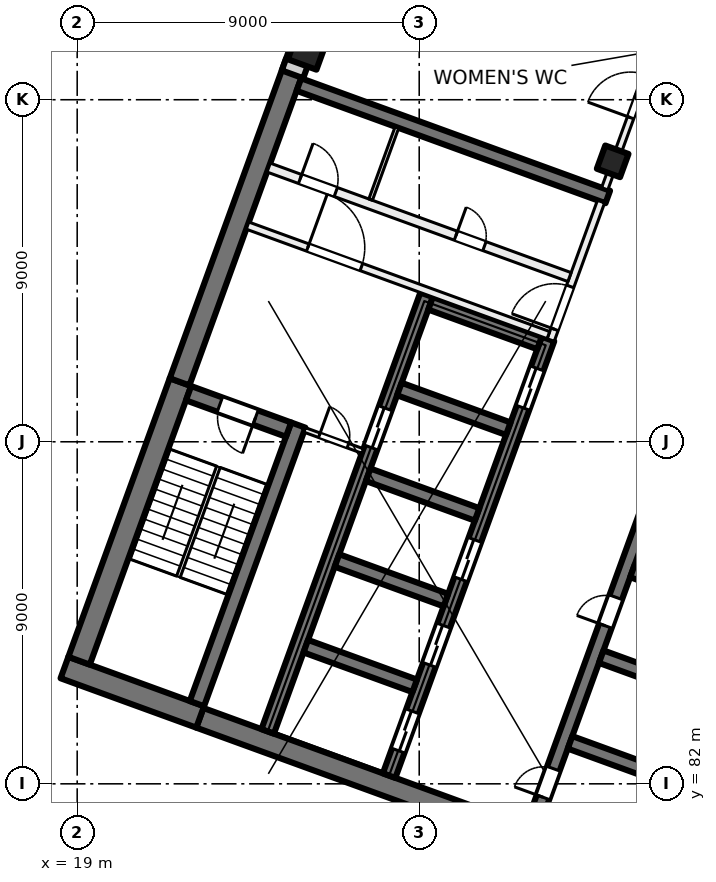
"""IFC4 building model, lengths in metres.
Left out: names, types, materials, properties, quantities, classifications, styles, units other than length and angle.
Written with IfcOpenShell. Run it as: python <this file> out.ifc"""

import sys

from ifc_helpers import new_model, si_unit, direction, frame, frame_2d, origin, origin_2d, place, context, subcontext, project, spatial, rectangle, extrude, element, fill, save


model = new_model("IFC4")
c1 = context("Model", 3, precision=1e-05, world=origin(), true_north=direction((0.0, 1.0)))
c2 = subcontext(c1, "Body", "Model", "MODEL_VIEW")
j1 = project(units=[si_unit("LENGTHUNIT", "METRE"), si_unit("PLANEANGLEUNIT", "RADIAN")], contexts=[c1])
p1 = place(None, origin())
s1 = spatial("IfcSite", under=j1, at=p1, CompositionType="ELEMENT")
p2 = place(p1, origin())
s2 = spatial("IfcBuilding", under=s1, at=p2, CompositionType="ELEMENT")
p3 = place(p2, frame((0.0, 0.0, 142.5)))
s3 = spatial("IfcBuildingStorey", under=s2, at=p3, CompositionType="ELEMENT", Elevation=142.5)
p4 = place(p3, frame((33.091, 98.379, 0.0), z_axis=(0.0, 0.0, 1.0), x_axis=(-0.342020143326, -0.939692620786, 0.0)))
e1 = element("IfcColumn", 1, at=p4, inside=s3, PredefinedType="COLUMN", context=c2, shape_type="SweptSolid", body=[
    extrude(rectangle(XDim=0.65, YDim=0.65, at=origin_2d()), origin(), (0.0, 0.0, 1.0), 4.0),
])
p5 = place(p3, frame((25.056, 101.303, 0.0), z_axis=(0.0, 0.0, 1.0), x_axis=(-0.342020143326, -0.939692620786, 0.0)))
e2 = element("IfcColumn", 2, at=p5, inside=s3, PredefinedType="COLUMN", context=c2, shape_type="SweptSolid", body=[
    extrude(rectangle(XDim=0.8, YDim=0.8, at=origin_2d()), origin(), (0.0, 0.0, 1.0), 4.0),
])
p6 = place(p3, frame((35.759, 78.811, 0.0), z_axis=(0.0, 0.0, 1.0), x_axis=(-0.939692894512, 0.342019391267, 0.0)))
e3 = element("IfcWall", 3, at=p6, inside=s3, PredefinedType="SHEAR", context=c2, shape_type="SweptSolid", body=[
    extrude(rectangle(XDim=14.4, YDim=0.55, at=frame_2d((7.2, 0.0))), origin(), (0.0, 0.0, 1.0), 4.0),
])
p7 = place(p3, frame((22.236, 83.76, 0.0), z_axis=(0.0, 0.0, 1.0), x_axis=(-0.939680822529, 0.342052557032, 0.0)))
e4 = element("IfcWall", 4, at=p7, inside=s3, PredefinedType="SHEAR", context=c2, shape_type="SweptSolid", body=[
    extrude(rectangle(XDim=3.8, YDim=0.6, at=frame_2d((1.9, 0.0))), origin(), (0.0, 0.0, 1.0), 4.0),
])
p8 = place(p3, frame((19.05, 85.239, 0.0), z_axis=(0.0, 0.0, 1.0), x_axis=(0.342016982193, 0.939693771338, 0.0)))
e5 = element("IfcWall", 5, at=p8, inside=s3, PredefinedType="SHEAR", context=c2, shape_type="SweptSolid", body=[
    extrude(rectangle(XDim=7.8, YDim=0.6, at=frame_2d((3.9, 0.0))), origin(), (0.0, 0.0, 1.0), 4.0),
])
p9 = place(p3, frame((21.694, 92.577, 0.0), z_axis=(0.0, 0.0, 1.0), x_axis=(0.342010253184, 0.939696220444, 0.0)))
e6 = element("IfcWall", 6, at=p9, inside=s3, PredefinedType="SHEAR", context=c2, shape_type="SweptSolid", body=[
    extrude(rectangle(XDim=8.95, YDim=0.55, at=frame_2d((4.475, 0.0))), origin(), (0.0, 0.0, 1.0), 4.0),
])
p10 = place(p3, frame((22.15, 84.11, 0.0), z_axis=(0.0, 0.0, 1.0), x_axis=(0.342016982193, 0.939693771338, 0.0)))
e7 = element("IfcWall", 7, at=p10, inside=s3, PredefinedType="SHEAR", context=c2, shape_type="SweptSolid", body=[
    extrude(rectangle(XDim=7.8, YDim=0.4, at=frame_2d((3.9, 0.0))), origin(), (0.0, 0.0, 1.0), 4.0),
])
p11 = place(p3, frame((24.562, 91.32, 0.0), z_axis=(0.0, 0.0, 1.0), x_axis=(-0.939717030584, 0.341953070509, 0.0)))
e8 = element("IfcWall", 8, at=p11, inside=s3, PredefinedType="SHEAR", context=c2, shape_type="SweptSolid", body=[
    extrude(rectangle(XDim=2.8, YDim=0.4, at=frame_2d((1.4, 0.0))), origin(), (0.0, 0.0, 1.0), 4.0),
])
p12 = place(p11, frame((0.925, 0.0, 0.0)))
e9 = element("IfcOpeningElement", 9, at=p12, cuts=e8, PredefinedType="OPENING", context=c2, shape_type="SweptSolid", body=[
    extrude(rectangle(XDim=1.0, YDim=2.1, at=frame_2d((0.5, 1.05))), frame((0.0, 0.21, 0.0), z_axis=(0.0, -1.0, 0.0), x_axis=(1.0, 0.0, 0.0)), (0.0, 0.0, 1.0), 0.42),
])
p13 = place(p3, frame((30.967, 80.848, 0.0), z_axis=(0.0, 0.0, 1.0), x_axis=(0.34201563943, 0.939694260058, 0.0)))
e10 = element("IfcWall", 10, at=p13, inside=s3, PredefinedType="SHEAR", context=c2, shape_type="SweptSolid", body=[
    extrude(rectangle(XDim=12.225, YDim=0.35, at=frame_2d((6.113, 0.0))), origin(), (0.0, 0.0, 1.0), 4.0),
])
p14 = place(p13, frame((0.85, 0.0, 0.0)))
e11 = element("IfcOpeningElement", 11, at=p14, cuts=e10, PredefinedType="OPENING", context=c2, shape_type="SweptSolid", body=[
    extrude(rectangle(XDim=0.8, YDim=2.1, at=frame_2d((0.4, 1.05))), frame((0.0, 0.185, 0.0), z_axis=(0.0, -1.0, 0.0), x_axis=(1.0, 0.0, 0.0)), (0.0, 0.0, 1.0), 0.37),
])
p15 = place(p13, frame((5.65, 0.0, 0.0)))
e12 = element("IfcOpeningElement", 12, at=p15, cuts=e10, PredefinedType="OPENING", context=c2, shape_type="SweptSolid", body=[
    extrude(rectangle(XDim=0.8, YDim=2.1, at=frame_2d((0.4, 1.05))), frame((0.0, 0.185, 0.0), z_axis=(0.0, -1.0, 0.0), x_axis=(1.0, 0.0, 0.0)), (0.0, 0.0, 1.0), 0.37),
])
p16 = place(p3, frame((34.835, 82.047, 0.0), z_axis=(0.0, 0.0, 1.0), x_axis=(-0.939683528043, 0.3420451244, 0.0)))
e13 = element("IfcWall", 13, at=p16, inside=s3, PredefinedType="SHEAR", context=c2, shape_type="SweptSolid", body=[
    extrude(rectangle(XDim=3.05, YDim=0.35, at=frame_2d((1.525, 0.0))), origin(), (0.0, 0.0, 1.0), 4.0),
])
p17 = place(p3, frame((35.656, 84.303, 0.0), z_axis=(0.0, 0.0, 1.0), x_axis=(-0.939709254651, 0.341974438698, 0.0)))
e14 = element("IfcWall", 14, at=p17, inside=s3, PredefinedType="SHEAR", context=c2, shape_type="SweptSolid", body=[
    extrude(rectangle(XDim=3.05, YDim=0.35, at=frame_2d((1.525, 0.0))), origin(), (0.0, 0.0, 1.0), 4.0),
])
p18 = place(p3, frame((36.477, 86.558, 0.0), z_axis=(0.0, 0.0, 1.0), x_axis=(-0.939683528043, 0.3420451244, 0.0)))
e15 = element("IfcWall", 15, at=p18, inside=s3, PredefinedType="SHEAR", context=c2, shape_type="SweptSolid", body=[
    extrude(rectangle(XDim=3.05, YDim=0.35, at=frame_2d((1.525, 0.0))), origin(), (0.0, 0.0, 1.0), 4.0),
])
p19 = place(p3, frame((27.208, 82.216, 0.0), z_axis=(0.0, 0.0, 1.0), x_axis=(0.34201563943, 0.939694260058, 0.0)))
e16 = element("IfcWall", 16, at=p19, inside=s3, PredefinedType="SHEAR", context=c2, shape_type="SweptSolid", body=[
    extrude(rectangle(XDim=12.225, YDim=0.35, at=frame_2d((6.113, 0.0))), origin(), (0.0, 0.0, 1.0), 4.0),
])
p20 = place(p19, frame((0.7, 0.0, 0.0)))
e17 = element("IfcOpeningElement", 17, at=p20, cuts=e16, PredefinedType="OPENING", context=c2, shape_type="SweptSolid", body=[
    extrude(rectangle(XDim=1.1, YDim=2.1, at=frame_2d((0.55, 1.05))), frame((0.0, 0.185, 0.0), z_axis=(0.0, -1.0, 0.0), x_axis=(1.0, 0.0, 0.0)), (0.0, 0.0, 1.0), 0.37),
])
p21 = place(p19, frame((3.1, 0.0, 0.0)))
e18 = element("IfcOpeningElement", 18, at=p21, cuts=e16, PredefinedType="OPENING", context=c2, shape_type="SweptSolid", body=[
    extrude(rectangle(XDim=1.1, YDim=2.1, at=frame_2d((0.55, 1.05))), frame((0.0, 0.185, 0.0), z_axis=(0.0, -1.0, 0.0), x_axis=(1.0, 0.0, 0.0)), (0.0, 0.0, 1.0), 0.37),
])
p22 = place(p19, frame((5.5, 0.0, 0.0)))
e19 = element("IfcOpeningElement", 19, at=p22, cuts=e16, PredefinedType="OPENING", context=c2, shape_type="SweptSolid", body=[
    extrude(rectangle(XDim=1.1, YDim=2.1, at=frame_2d((0.55, 1.05))), frame((0.0, 0.185, 0.0), z_axis=(0.0, -1.0, 0.0), x_axis=(1.0, 0.0, 0.0)), (0.0, 0.0, 1.0), 0.37),
])
p23 = place(p19, frame((10.3, 0.0, 0.0)))
e20 = element("IfcOpeningElement", 20, at=p23, cuts=e16, PredefinedType="OPENING", context=c2, shape_type="SweptSolid", body=[
    extrude(rectangle(XDim=1.1, YDim=2.1, at=frame_2d((0.55, 1.05))), frame((0.0, 0.185, 0.0), z_axis=(0.0, -1.0, 0.0), x_axis=(1.0, 0.0, 0.0)), (0.0, 0.0, 1.0), 0.37),
])
p24 = place(p3, frame((24.013, 83.379, 0.0), z_axis=(0.0, 0.0, 1.0), x_axis=(0.34201563943, 0.939694260058, 0.0)))
e21 = element("IfcWall", 21, at=p24, inside=s3, PredefinedType="SHEAR", context=c2, shape_type="SweptSolid", body=[
    extrude(rectangle(XDim=12.225, YDim=0.35, at=frame_2d((6.113, 0.0))), origin(), (0.0, 0.0, 1.0), 4.0),
])
p25 = place(p24, frame((7.95, 0.0, 0.0)))
e22 = element("IfcOpeningElement", 22, at=p25, cuts=e21, PredefinedType="OPENING", context=c2, shape_type="SweptSolid", body=[
    extrude(rectangle(XDim=1.1, YDim=2.1, at=frame_2d((0.55, 1.05))), frame((0.0, 0.185, 0.0), z_axis=(0.0, -1.0, 0.0), x_axis=(1.0, 0.0, 0.0)), (0.0, 0.0, 1.0), 0.37),
])
for number, where, z_axis, x_axis in (
    (23, (27.881, 84.578, 0.0), (0.0, 0.0, 1.0), (-0.94, 0.342, 0.0)),
    (24, (28.702, 86.833, 0.0), (0.0, 0.0, 1.0), (-0.94, 0.342, 0.0)),
    (25, (29.523, 89.089, 0.0), (0.0, 0.0, 1.0), (-0.94, 0.342, 0.0)),
):
    element("IfcWall", number, at=place(p3, frame(where, z_axis=z_axis, x_axis=x_axis)), inside=s3, PredefinedType="SHEAR", context=c2, shape_type="SweptSolid", body=[
        extrude(rectangle(XDim=3.05, YDim=0.35, at=frame_2d((1.525, 0.0))), origin(), (0.0, 0.0, 1.0), 4.0),
    ])
p26 = place(p3, frame((30.344, 91.344, 0.0), z_axis=(0.0, 0.0, 1.0), x_axis=(-0.939709254651, 0.341974438698, 0.0)))
e26 = element("IfcWall", 26, at=p26, inside=s3, PredefinedType="SHEAR", context=c2, shape_type="SweptSolid", body=[
    extrude(rectangle(XDim=3.05, YDim=0.35, at=frame_2d((1.525, 0.0))), origin(), (0.0, 0.0, 1.0), 4.0),
])
p27 = place(p3, frame((31.165, 93.599, 0.0), z_axis=(0.0, 0.0, 1.0), x_axis=(-0.939683528043, 0.3420451244, 0.0)))
e27 = element("IfcWall", 27, at=p27, inside=s3, PredefinedType="SHEAR", context=c2, shape_type="SweptSolid", body=[
    extrude(rectangle(XDim=3.05, YDim=0.35, at=frame_2d((1.525, 0.0))), origin(), (0.0, 0.0, 1.0), 4.0),
])
p28 = place(p3, frame((32.962, 97.441, 0.0), z_axis=(0.0, 0.0, 1.0), x_axis=(-0.939689545667, 0.342028592028, 0.0)))
e28 = element("IfcWall", 28, at=p28, inside=s3, PredefinedType="SHEAR", context=c2, shape_type="SweptSolid", body=[
    extrude(rectangle(XDim=8.65, YDim=0.35, at=frame_2d((4.325, 0.0))), origin(), (0.0, 0.0, 1.0), 4.0),
])
p29 = place(p3, frame((24.666, 100.669, 0.0), z_axis=(0.0, 0.0, 1.0), x_axis=(0.34201964167, 0.939692803373, 0.0)))
e29 = element("IfcWall", 29, at=p29, inside=s3, PredefinedType="SOLIDWALL", context=c2, shape_type="SweptSolid", body=[
    extrude(rectangle(XDim=32.884, YDim=0.6, at=frame_2d((16.442, 0.0))), origin(), (0.0, 0.0, 1.0), 3.625),
])
p30 = place(p29, frame((1.48, 0.0, 0.9)))
e30 = element("IfcOpeningElement", 30, at=p30, cuts=e29, PredefinedType="OPENING", context=c2, shape_type="SweptSolid", body=[
    extrude(rectangle(XDim=3.0, YDim=2.4, at=frame_2d((1.5, 1.2))), frame((0.0, 0.31, 0.0), z_axis=(0.0, -1.0, 0.0), x_axis=(1.0, 0.0, 0.0)), (0.0, 0.0, 1.0), 0.62),
])
p31 = place(p29, frame((5.98, 0.0, 0.9)))
e31 = element("IfcOpeningElement", 31, at=p31, cuts=e29, PredefinedType="OPENING", context=c2, shape_type="SweptSolid", body=[
    extrude(rectangle(XDim=3.0, YDim=2.4, at=frame_2d((1.5, 1.2))), frame((0.0, 0.31, 0.0), z_axis=(0.0, -1.0, 0.0), x_axis=(1.0, 0.0, 0.0)), (0.0, 0.0, 1.0), 0.62),
])
p32 = place(p29, frame((11.08, 0.0, 0.0)))
e32 = element("IfcOpeningElement", 32, at=p32, cuts=e29, PredefinedType="OPENING", context=c2, shape_type="SweptSolid", body=[
    extrude(rectangle(XDim=1.8, YDim=2.4, at=frame_2d((0.9, 1.2))), frame((0.0, 0.31, 0.0), z_axis=(0.0, -1.0, 0.0), x_axis=(1.0, 0.0, 0.0)), (0.0, 0.0, 1.0), 0.62),
])
p33 = place(p29, frame((14.98, 0.0, 0.9)))
e33 = element("IfcOpeningElement", 33, at=p33, cuts=e29, PredefinedType="OPENING", context=c2, shape_type="SweptSolid", body=[
    extrude(rectangle(XDim=3.0, YDim=2.4, at=frame_2d((1.5, 1.2))), frame((0.0, 0.31, 0.0), z_axis=(0.0, -1.0, 0.0), x_axis=(1.0, 0.0, 0.0)), (0.0, 0.0, 1.0), 0.62),
])
p34 = place(p29, frame((19.48, 0.0, 0.9)))
e34 = element("IfcOpeningElement", 34, at=p34, cuts=e29, PredefinedType="OPENING", context=c2, shape_type="SweptSolid", body=[
    extrude(rectangle(XDim=3.0, YDim=2.4, at=frame_2d((1.5, 1.2))), frame((0.0, 0.31, 0.0), z_axis=(0.0, -1.0, 0.0), x_axis=(1.0, 0.0, 0.0)), (0.0, 0.0, 1.0), 0.62),
])
p35 = place(p29, frame((24.58, 0.0, 0.0)))
e35 = element("IfcOpeningElement", 35, at=p35, cuts=e29, PredefinedType="OPENING", context=c2, shape_type="SweptSolid", body=[
    extrude(rectangle(XDim=1.8, YDim=2.4, at=frame_2d((0.9, 1.2))), frame((0.0, 0.31, 0.0), z_axis=(0.0, -1.0, 0.0), x_axis=(1.0, 0.0, 0.0)), (0.0, 0.0, 1.0), 0.62),
])
p36 = place(p29, frame((28.48, 0.0, 0.9)))
e36 = element("IfcOpeningElement", 36, at=p36, cuts=e29, PredefinedType="OPENING", context=c2, shape_type="SweptSolid", body=[
    extrude(rectangle(XDim=3.0, YDim=2.4, at=frame_2d((1.5, 1.2))), frame((0.0, 0.31, 0.0), z_axis=(0.0, -1.0, 0.0), x_axis=(1.0, 0.0, 0.0)), (0.0, 0.0, 1.0), 0.62),
])
p37 = place(p3, frame((31.459, 93.678, 0.0), z_axis=(0.0, 0.0, 1.0), x_axis=(0.341985870128, 0.939705094502, 0.0)))
e37 = element("IfcWall", 37, at=p37, inside=s3, PredefinedType="PARTITIONING", context=c2, shape_type="SweptSolid", body=[
    extrude(rectangle(XDim=3.875, YDim=0.2, at=frame_2d((1.938, 0.0))), origin(), (0.0, 0.0, 1.0), 3.625),
])
p38 = place(p37, frame((0.3, 0.0, 0.0)))
e38 = element("IfcOpeningElement", 38, at=p38, cuts=e37, PredefinedType="OPENING", context=c2, shape_type="SweptSolid", body=[
    extrude(rectangle(XDim=1.2, YDim=2.1, at=frame_2d((0.6, 1.05))), frame((0.0, 0.11, 0.0), z_axis=(0.0, -1.0, 0.0), x_axis=(1.0, 0.0, 0.0)), (0.0, 0.0, 1.0), 0.22),
])
p39 = place(p3, frame((23.483, 96.688, 0.0), z_axis=(0.0, 0.0, 1.0), x_axis=(0.939691007314, -0.342024576271, 0.0)))
e39 = element("IfcWall", 39, at=p39, inside=s3, PredefinedType="PARTITIONING", context=c2, shape_type="SweptSolid", body=[
    extrude(rectangle(XDim=8.425, YDim=0.2, at=frame_2d((4.212, 0.0))), origin(), (0.0, 0.0, 1.0), 3.625),
])
p40 = place(p39, frame((1.688, 0.0, 0.0)))
e40 = element("IfcOpeningElement", 40, at=p40, cuts=e39, PredefinedType="OPENING", context=c2, shape_type="SweptSolid", body=[
    extrude(rectangle(XDim=1.5, YDim=2.1, at=frame_2d((0.75, 1.05))), frame((0.0, 0.11, 0.0), z_axis=(0.0, -1.0, 0.0), x_axis=(1.0, 0.0, 0.0)), (0.0, 0.0, 1.0), 0.22),
])
p41 = place(p3, frame((24.039, 98.215, 0.0), z_axis=(0.0, 0.0, 1.0), x_axis=(0.939687617333, -0.342033889887, 0.0)))
e41 = element("IfcWall", 41, at=p41, inside=s3, PredefinedType="PARTITIONING", context=c2, shape_type="SweptSolid", body=[
    extrude(rectangle(XDim=8.425, YDim=0.25, at=frame_2d((4.212, 0.0))), origin(), (0.0, 0.0, 1.0), 3.625),
])
p42 = place(p41, frame((5.242, 0.0, 0.0)))
e42 = element("IfcOpeningElement", 42, at=p42, cuts=e41, PredefinedType="OPENING", context=c2, shape_type="SweptSolid", body=[
    extrude(rectangle(XDim=0.8, YDim=2.1, at=frame_2d((0.4, 1.05))), frame((0.0, 0.135, 0.0), z_axis=(0.0, -1.0, 0.0), x_axis=(1.0, 0.0, 0.0)), (0.0, 0.0, 1.0), 0.27),
])
p43 = place(p41, frame((0.88, 0.0, 0.0)))
e43 = element("IfcOpeningElement", 43, at=p43, cuts=e41, PredefinedType="OPENING", context=c2, shape_type="SweptSolid", body=[
    extrude(rectangle(XDim=1.0, YDim=2.1, at=frame_2d((0.5, 1.05))), frame((0.0, 0.135, 0.0), z_axis=(0.0, -1.0, 0.0), x_axis=(1.0, 0.0, 0.0)), (0.0, 0.0, 1.0), 0.27),
])
p44 = place(p3, frame((24.985, 91.312, 0.0), z_axis=(0.0, 0.0, 1.0), x_axis=(0.939705651352, -0.341984340019, 0.0)))
e44 = element("IfcWall", 44, at=p44, inside=s3, PredefinedType="PARTITIONING", context=c2, shape_type="SweptSolid", body=[
    extrude(rectangle(XDim=1.625, YDim=0.125, at=frame_2d((0.812, 0.0))), origin(), (0.0, 0.0, 1.0), 3.625),
])
p45 = place(p44, frame((0.413, 0.0, 0.0)))
e45 = element("IfcOpeningElement", 45, at=p45, cuts=e44, PredefinedType="OPENING", context=c2, shape_type="SweptSolid", body=[
    extrude(rectangle(XDim=0.8, YDim=2.1, at=frame_2d((0.4, 1.05))), frame((0.0, 0.073, 0.0), z_axis=(0.0, -1.0, 0.0), x_axis=(1.0, 0.0, 0.0)), (0.0, 0.0, 1.0), 0.145),
])
p46 = place(p3, frame((26.722, 97.371, 0.0), z_axis=(0.0, 0.0, 1.0), x_axis=(0.342004391282, 0.939698353911, 0.0)))
e46 = element("IfcWall", 46, at=p46, inside=s3, PredefinedType="PARTITIONING", context=c2, shape_type="SweptSolid", body=[
    extrude(rectangle(XDim=2.025, YDim=0.1, at=frame_2d((1.013, 0.0))), origin(), (0.0, 0.0, 1.0), 3.625),
])
p47 = place(p3, frame((26.736, 105.48, 0.0), z_axis=(0.0, 0.0, 1.0), x_axis=(0.939721611154, -0.341940482438, 0.0)))
e47 = element("IfcWall", 47, at=p47, inside=s3, PredefinedType="PARTITIONING", context=c2, shape_type="SweptSolid", body=[
    extrude(rectangle(XDim=12.312, YDim=0.175, at=frame_2d((6.156, 0.0))), origin(), (0.0, 0.0, 1.0), 3.625),
])
p48 = place(p3, frame((32.881, 97.657, 0.0), z_axis=(0.0, 0.0, 1.0), x_axis=(0.342058204353, 0.939678766832, 0.0)))
e48 = element("IfcWall", 48, at=p48, inside=s3, PredefinedType="PARTITIONING", context=c2, shape_type="SweptSolid", body=[
    extrude(rectangle(XDim=5.163, YDim=0.175, at=frame_2d((2.581, 0.0))), origin(), (0.0, 0.0, 1.0), 3.625),
])
p49 = place(p48, frame((1.991, 0.0, 0.0)))
e49 = element("IfcOpeningElement", 49, at=p49, cuts=e48, PredefinedType="OPENING", context=c2, shape_type="SweptSolid", body=[
    extrude(rectangle(XDim=1.2, YDim=2.1, at=frame_2d((0.6, 1.05))), frame((0.0, 0.097, 0.0), z_axis=(0.0, -1.0, 0.0), x_axis=(1.0, 0.0, 0.0)), (0.0, 0.0, 1.0), 0.195),
])
p50 = place(p20, origin())
e50 = element("IfcDoor", 50, at=p50, inside=s3, OperationType="DOUBLE_DOOR_SLIDING", PredefinedType="DOOR", context=c2, shape_type="SweptSolid", body=[
    extrude(rectangle(XDim=1.1, YDim=2.1, at=frame_2d((0.55, 1.05))), frame((0.0, 0.025, 0.0), z_axis=(0.0, -1.0, 0.0), x_axis=(1.0, 0.0, 0.0)), (0.0, 0.0, 1.0), 0.05),
])
fill(e17, e50)
p51 = place(p21, origin())
e51 = element("IfcDoor", 51, at=p51, inside=s3, OperationType="DOUBLE_DOOR_SLIDING", PredefinedType="DOOR", context=c2, shape_type="SweptSolid", body=[
    extrude(rectangle(XDim=1.1, YDim=2.1, at=frame_2d((0.55, 1.05))), frame((0.0, 0.025, 0.0), z_axis=(0.0, -1.0, 0.0), x_axis=(1.0, 0.0, 0.0)), (0.0, 0.0, 1.0), 0.05),
])
fill(e18, e51)
p52 = place(p22, origin())
e52 = element("IfcDoor", 52, at=p52, inside=s3, OperationType="DOUBLE_DOOR_SLIDING", PredefinedType="DOOR", context=c2, shape_type="SweptSolid", body=[
    extrude(rectangle(XDim=1.1, YDim=2.1, at=frame_2d((0.55, 1.05))), frame((0.0, 0.025, 0.0), z_axis=(0.0, -1.0, 0.0), x_axis=(1.0, 0.0, 0.0)), (0.0, 0.0, 1.0), 0.05),
])
fill(e19, e52)
p53 = place(p23, origin())
e53 = element("IfcDoor", 53, at=p53, inside=s3, OperationType="DOUBLE_DOOR_SLIDING", PredefinedType="DOOR", context=c2, shape_type="SweptSolid", body=[
    extrude(rectangle(XDim=1.1, YDim=2.1, at=frame_2d((0.55, 1.05))), frame((0.0, 0.025, 0.0), z_axis=(0.0, -1.0, 0.0), x_axis=(1.0, 0.0, 0.0)), (0.0, 0.0, 1.0), 0.05),
])
fill(e20, e53)
p54 = place(p14, origin())
e54 = element("IfcDoor", 54, at=p54, inside=s3, OperationType="SINGLE_SWING_LEFT", PredefinedType="DOOR", context=c2, shape_type="SweptSolid", body=[
    extrude(rectangle(XDim=0.8, YDim=2.1, at=frame_2d((0.4, 1.05))), frame((0.0, 0.025, 0.0), z_axis=(0.0, -1.0, 0.0), x_axis=(1.0, 0.0, 0.0)), (0.0, 0.0, 1.0), 0.05),
])
fill(e11, e54)
p55 = place(p15, origin())
e55 = element("IfcDoor", 55, at=p55, inside=s3, OperationType="SINGLE_SWING_RIGHT", PredefinedType="DOOR", context=c2, shape_type="SweptSolid", body=[
    extrude(rectangle(XDim=0.8, YDim=2.1, at=frame_2d((0.4, 1.05))), frame((0.0, 0.025, 0.0), z_axis=(0.0, -1.0, 0.0), x_axis=(1.0, 0.0, 0.0)), (0.0, 0.0, 1.0), 0.05),
])
fill(e12, e55)
p56 = place(p38, origin())
e56 = element("IfcDoor", 56, at=p56, inside=s3, OperationType="DOUBLE_DOOR_SINGLE_SWING", PredefinedType="DOOR", context=c2, shape_type="SweptSolid", body=[
    extrude(rectangle(XDim=1.2, YDim=2.1, at=frame_2d((0.6, 1.05))), frame((0.0, 0.025, 0.0), z_axis=(0.0, -1.0, 0.0), x_axis=(1.0, 0.0, 0.0)), (0.0, 0.0, 1.0), 0.05),
])
fill(e38, e56)
p57 = place(p40, origin())
e57 = element("IfcDoor", 57, at=p57, inside=s3, OperationType="DOUBLE_DOOR_SINGLE_SWING", PredefinedType="DOOR", context=c2, shape_type="SweptSolid", body=[
    extrude(rectangle(XDim=1.5, YDim=2.1, at=frame_2d((0.75, 1.05))), frame((0.0, 0.025, 0.0), z_axis=(0.0, -1.0, 0.0), x_axis=(1.0, 0.0, 0.0)), (0.0, 0.0, 1.0), 0.05),
])
fill(e40, e57)
p58 = place(p12, origin())
e58 = element("IfcDoor", 58, at=p58, inside=s3, OperationType="SINGLE_SWING_LEFT", PredefinedType="DOOR", context=c2, shape_type="SweptSolid", body=[
    extrude(rectangle(XDim=1.0, YDim=2.1, at=frame_2d((0.5, 1.05))), frame((0.0, 0.025, 0.0), z_axis=(0.0, -1.0, 0.0), x_axis=(1.0, 0.0, 0.0)), (0.0, 0.0, 1.0), 0.05),
])
fill(e9, e58)
p59 = place(p45, origin())
e59 = element("IfcDoor", 59, at=p59, inside=s3, OperationType="SINGLE_SWING_RIGHT", PredefinedType="DOOR", context=c2, shape_type="SweptSolid", body=[
    extrude(rectangle(XDim=0.8, YDim=2.1, at=frame_2d((0.4, 1.05))), frame((0.0, 0.025, 0.0), z_axis=(0.0, -1.0, 0.0), x_axis=(1.0, 0.0, 0.0)), (0.0, 0.0, 1.0), 0.05),
])
fill(e45, e59)
p60 = place(p42, origin())
e60 = element("IfcDoor", 60, at=p60, inside=s3, OperationType="SINGLE_SWING_LEFT", PredefinedType="DOOR", context=c2, shape_type="SweptSolid", body=[
    extrude(rectangle(XDim=0.8, YDim=2.1, at=frame_2d((0.4, 1.05))), frame((0.0, 0.025, 0.0), z_axis=(0.0, -1.0, 0.0), x_axis=(1.0, 0.0, 0.0)), (0.0, 0.0, 1.0), 0.05),
])
fill(e42, e60)
p61 = place(p43, origin())
e61 = element("IfcDoor", 61, at=p61, inside=s3, OperationType="SINGLE_SWING_RIGHT", PredefinedType="DOOR", context=c2, shape_type="SweptSolid", body=[
    extrude(rectangle(XDim=1.0, YDim=2.1, at=frame_2d((0.5, 1.05))), frame((0.0, 0.025, 0.0), z_axis=(0.0, -1.0, 0.0), x_axis=(1.0, 0.0, 0.0)), (0.0, 0.0, 1.0), 0.05),
])
fill(e43, e61)
p62 = place(p25, origin())
e62 = element("IfcDoor", 62, at=p62, inside=s3, OperationType="DOUBLE_DOOR_SLIDING", PredefinedType="DOOR", context=c2, shape_type="SweptSolid", body=[
    extrude(rectangle(XDim=1.1, YDim=2.1, at=frame_2d((0.55, 1.05))), frame((0.0, 0.025, 0.0), z_axis=(0.0, -1.0, 0.0), x_axis=(1.0, 0.0, 0.0)), (0.0, 0.0, 1.0), 0.05),
])
fill(e22, e62)
p63 = place(p49, origin())
e63 = element("IfcDoor", 63, at=p63, inside=s3, OperationType="DOUBLE_DOOR_SINGLE_SWING", PredefinedType="DOOR", context=c2, shape_type="SweptSolid", body=[
    extrude(rectangle(XDim=1.2, YDim=2.1, at=frame_2d((0.6, 1.05))), frame((0.0, 0.025, 0.0), z_axis=(0.0, -1.0, 0.0), x_axis=(1.0, 0.0, 0.0)), (0.0, 0.0, 1.0), 0.05),
])
fill(e49, e63)
save(model, sys.argv[1])
